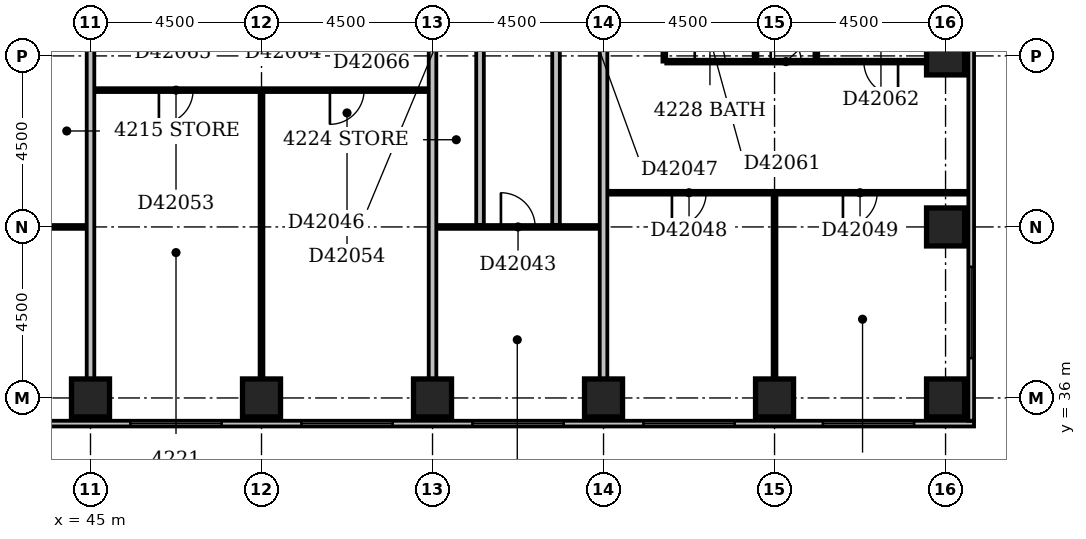
"""IFC4 building model, lengths in metres.
Left out: names, types, materials, properties, quantities, classifications, styles, units other than length and angle.
Written with IfcOpenShell. Run it as: python <this file> out.ifc"""

import sys

from ifc_helpers import new_model, si_unit, direction, frame, frame_2d, origin, origin_2d, place, context, subcontext, project, spatial, rectangle, extrude, element, fill, save


model = new_model("IFC4")
c1 = context("Model", 3, precision=1e-05, world=origin(), true_north=direction((0.0, 1.0)))
c2 = subcontext(c1, "Body", "Model", "MODEL_VIEW")
j1 = project(units=[si_unit("LENGTHUNIT", "METRE"), si_unit("PLANEANGLEUNIT", "RADIAN")], contexts=[c1])
p1 = place(None, origin())
s1 = spatial("IfcSite", under=j1, at=p1, CompositionType="ELEMENT")
p2 = place(p1, origin())
s2 = spatial("IfcBuilding", under=s1, at=p2, CompositionType="ELEMENT")
p3 = place(p2, frame((0.0, 0.0, 166.4)))
s3 = spatial("IfcBuildingStorey", under=s2, at=p3, CompositionType="ELEMENT", Elevation=166.4)
for number, where, z_axis, x_axis in (
    (1, (45.0, 36.0, -0.3), (0.0, 0.0, 1.0), (1.0, 0.0, 0.0)),
    (2, (49.5, 36.0, -0.3), (0.0, 0.0, 1.0), (1.0, 0.0, 0.0)),
    (3, (54.0, 36.0, -0.3), (0.0, 0.0, 1.0), (1.0, 0.0, 0.0)),
    (4, (58.5, 36.0, -0.3), (0.0, 0.0, 1.0), (1.0, 0.0, 0.0)),
    (5, (63.0, 36.0, -0.3), (0.0, 0.0, 1.0), (1.0, 0.0, 0.0)),
    (6, (67.5, 36.0, -0.3), (0.0, 0.0, 1.0), (1.0, 0.0, 0.0)),
    (7, (67.5, 40.5, -0.3), (0.0, 0.0, 1.0), (1.0, 0.0, 0.0)),
    (8, (67.5, 45.0, -0.3), (0.0, 0.0, 1.0), (1.0, 0.0, 0.0)),
):
    element("IfcColumn", number, at=place(p3, frame(where, z_axis=z_axis, x_axis=x_axis)), inside=s3, PredefinedType="COLUMN", context=c2, shape_type="SweptSolid", body=[
        extrude(rectangle(XDim=1.0, YDim=1.0, at=origin_2d()), origin(), (0.0, 0.0, 1.0), 3.6),
    ])
p4 = place(p3, frame((23.1, 35.325, 0.0), z_axis=(0.0, 0.0, 1.0), x_axis=(1.0, 0.0, 0.0)))
e9 = element("IfcWall", 9, at=p4, inside=s3, PredefinedType="STANDARD", context=c2, shape_type="SweptSolid", body=[
    extrude(rectangle(XDim=45.15, YDim=0.15, at=frame_2d((22.575, 0.0))), origin(), (0.0, 0.0, 1.0), 2.7),
])
p5 = place(p4, frame((0.45, 0.0, 0.6)))
e10 = element("IfcOpeningElement", 10, at=p5, cuts=e9, PredefinedType="OPENING", context=c2, shape_type="SweptSolid", body=[
    extrude(rectangle(XDim=2.4, YDim=1.8, at=frame_2d((1.2, 0.9))), frame((0.0, 0.087, 0.0), z_axis=(0.0, -1.0, 0.0), x_axis=(1.0, 0.0, 0.0)), (0.0, 0.0, 1.0), 0.174),
])
p6 = place(p4, frame((4.95, 0.0, 0.6)))
e11 = element("IfcOpeningElement", 11, at=p6, cuts=e9, PredefinedType="OPENING", context=c2, shape_type="SweptSolid", body=[
    extrude(rectangle(XDim=2.4, YDim=1.8, at=frame_2d((1.2, 0.9))), frame((0.0, 0.087, 0.0), z_axis=(0.0, -1.0, 0.0), x_axis=(1.0, 0.0, 0.0)), (0.0, 0.0, 1.0), 0.174),
])
p7 = place(p4, frame((10.665, 0.0, 0.6)))
e12 = element("IfcOpeningElement", 12, at=p7, cuts=e9, PredefinedType="OPENING", context=c2, shape_type="SweptSolid", body=[
    extrude(rectangle(XDim=1.5, YDim=1.8, at=frame_2d((0.75, 0.9))), frame((0.0, 0.087, 0.0), z_axis=(0.0, -1.0, 0.0), x_axis=(1.0, 0.0, 0.0)), (0.0, 0.0, 1.0), 0.174),
])
p8 = place(p4, frame((13.731, 0.0, 0.6)))
e13 = element("IfcOpeningElement", 13, at=p8, cuts=e9, PredefinedType="OPENING", context=c2, shape_type="SweptSolid", body=[
    extrude(rectangle(XDim=1.5, YDim=1.8, at=frame_2d((0.75, 0.9))), frame((0.0, 0.087, 0.0), z_axis=(0.0, -1.0, 0.0), x_axis=(1.0, 0.0, 0.0)), (0.0, 0.0, 1.0), 0.174),
])
p9 = place(p4, frame((18.45, 0.0, 0.6)))
e14 = element("IfcOpeningElement", 14, at=p9, cuts=e9, PredefinedType="OPENING", context=c2, shape_type="SweptSolid", body=[
    extrude(rectangle(XDim=2.4, YDim=1.8, at=frame_2d((1.2, 0.9))), frame((0.0, 0.087, 0.0), z_axis=(0.0, -1.0, 0.0), x_axis=(1.0, 0.0, 0.0)), (0.0, 0.0, 1.0), 0.174),
])
p10 = place(p4, frame((22.95, 0.0, 0.6)))
e15 = element("IfcOpeningElement", 15, at=p10, cuts=e9, PredefinedType="OPENING", context=c2, shape_type="SweptSolid", body=[
    extrude(rectangle(XDim=2.4, YDim=1.8, at=frame_2d((1.2, 0.9))), frame((0.0, 0.087, 0.0), z_axis=(0.0, -1.0, 0.0), x_axis=(1.0, 0.0, 0.0)), (0.0, 0.0, 1.0), 0.174),
])
p11 = place(p4, frame((27.45, 0.0, 0.6)))
e16 = element("IfcOpeningElement", 16, at=p11, cuts=e9, PredefinedType="OPENING", context=c2, shape_type="SweptSolid", body=[
    extrude(rectangle(XDim=2.4, YDim=1.8, at=frame_2d((1.2, 0.9))), frame((0.0, 0.087, 0.0), z_axis=(0.0, -1.0, 0.0), x_axis=(1.0, 0.0, 0.0)), (0.0, 0.0, 1.0), 0.174),
])
p12 = place(p4, frame((31.95, 0.0, 0.6)))
e17 = element("IfcOpeningElement", 17, at=p12, cuts=e9, PredefinedType="OPENING", context=c2, shape_type="SweptSolid", body=[
    extrude(rectangle(XDim=2.4, YDim=1.8, at=frame_2d((1.2, 0.9))), frame((0.0, 0.087, 0.0), z_axis=(0.0, -1.0, 0.0), x_axis=(1.0, 0.0, 0.0)), (0.0, 0.0, 1.0), 0.174),
])
p13 = place(p4, frame((36.45, 0.0, 0.6)))
e18 = element("IfcOpeningElement", 18, at=p13, cuts=e9, PredefinedType="OPENING", context=c2, shape_type="SweptSolid", body=[
    extrude(rectangle(XDim=2.4, YDim=1.8, at=frame_2d((1.2, 0.9))), frame((0.0, 0.087, 0.0), z_axis=(0.0, -1.0, 0.0), x_axis=(1.0, 0.0, 0.0)), (0.0, 0.0, 1.0), 0.174),
])
p14 = place(p4, frame((41.172, 0.0, 0.6)))
e19 = element("IfcOpeningElement", 19, at=p14, cuts=e9, PredefinedType="OPENING", context=c2, shape_type="SweptSolid", body=[
    extrude(rectangle(XDim=2.4, YDim=1.8, at=frame_2d((1.2, 0.9))), frame((0.0, 0.087, 0.0), z_axis=(0.0, -1.0, 0.0), x_axis=(1.0, 0.0, 0.0)), (0.0, 0.0, 1.0), 0.174),
])
p15 = place(p3, frame((68.175, 35.4, 0.0), z_axis=(0.0, 0.0, 1.0), x_axis=(0.0, 1.0, 0.0)))
e20 = element("IfcWall", 20, at=p15, inside=s3, PredefinedType="STANDARD", context=c2, shape_type="SweptSolid", body=[
    extrude(rectangle(XDim=23.85, YDim=0.15, at=frame_2d((11.925, 0.0))), origin(), (0.0, 0.0, 1.0), 2.7),
])
p16 = place(p15, frame((1.65, 0.0, 0.6)))
e21 = element("IfcOpeningElement", 21, at=p16, cuts=e20, PredefinedType="OPENING", context=c2, shape_type="SweptSolid", body=[
    extrude(rectangle(XDim=2.4, YDim=1.8, at=frame_2d((1.2, 0.9))), frame((0.0, 0.087, 0.0), z_axis=(0.0, -1.0, 0.0), x_axis=(1.0, 0.0, 0.0)), (0.0, 0.0, 1.0), 0.174),
])
p17 = place(p15, frame((11.769, 0.0, 0.6)))
e22 = element("IfcOpeningElement", 22, at=p17, cuts=e20, PredefinedType="OPENING", context=c2, shape_type="SweptSolid", body=[
    extrude(rectangle(XDim=1.5, YDim=1.8, at=frame_2d((0.75, 0.9))), frame((0.0, 0.087, 0.0), z_axis=(0.0, -1.0, 0.0), x_axis=(1.0, 0.0, 0.0)), (0.0, 0.0, 1.0), 0.174),
])
p18 = place(p15, frame((19.65, 0.0, 0.6)))
e23 = element("IfcOpeningElement", 23, at=p18, cuts=e20, PredefinedType="OPENING", context=c2, shape_type="SweptSolid", body=[
    extrude(rectangle(XDim=2.4, YDim=1.8, at=frame_2d((1.2, 0.9))), frame((0.0, 0.087, 0.0), z_axis=(0.0, -1.0, 0.0), x_axis=(1.0, 0.0, 0.0)), (0.0, 0.0, 1.0), 0.174),
])
p19 = place(p3, frame((45.0, 36.5, 0.0), z_axis=(0.0, 0.0, 1.0), x_axis=(0.0, 1.0, 0.0)))
e24 = element("IfcWall", 24, at=p19, inside=s3, PredefinedType="PARTITIONING", context=c2, shape_type="SweptSolid", body=[
    extrude(rectangle(XDim=12.9, YDim=0.2, at=frame_2d((6.45, 0.0))), origin(), (0.0, 0.0, 1.0), 2.6),
])
p20 = place(p3, frame((49.5, 36.5, 0.0), z_axis=(0.0, 0.0, 1.0), x_axis=(0.0, 1.0, 0.0)))
e25 = element("IfcWall", 25, at=p20, inside=s3, PredefinedType="PARTITIONING", context=c2, shape_type="SweptSolid", body=[
    extrude(rectangle(XDim=7.55, YDim=0.1, at=frame_2d((3.775, 0.0))), origin(), (0.0, 0.0, 1.0), 3.3),
])
p21 = place(p3, frame((54.0, 36.5, 0.0), z_axis=(0.0, 0.0, 1.0), x_axis=(0.0, 1.0, 0.0)))
e26 = element("IfcWall", 26, at=p21, inside=s3, PredefinedType="PARTITIONING", context=c2, shape_type="SweptSolid", body=[
    extrude(rectangle(XDim=12.9, YDim=0.2, at=frame_2d((6.45, 0.0))), origin(), (0.0, 0.0, 1.0), 2.6),
])
p22 = place(p3, frame((58.5, 36.5, 0.0), z_axis=(0.0, 0.0, 1.0), x_axis=(0.0, 1.0, 0.0)))
e27 = element("IfcWall", 27, at=p22, inside=s3, PredefinedType="PARTITIONING", context=c2, shape_type="SweptSolid", body=[
    extrude(rectangle(XDim=12.9, YDim=0.2, at=frame_2d((6.45, 0.0))), origin(), (0.0, 0.0, 1.0), 3.3),
])
p23 = place(p3, frame((63.0, 36.5, 0.0), z_axis=(0.0, 0.0, 1.0), x_axis=(0.0, 1.0, 0.0)))
e28 = element("IfcWall", 28, at=p23, inside=s3, PredefinedType="PARTITIONING", context=c2, shape_type="SweptSolid", body=[
    extrude(rectangle(XDim=4.85, YDim=0.1, at=frame_2d((2.425, 0.0))), origin(), (0.0, 0.0, 1.0), 2.4),
])
p24 = place(p3, frame((40.6, 40.5, 0.0), z_axis=(0.0, 0.0, 1.0), x_axis=(1.0, 0.0, 0.0)))
e29 = element("IfcWall", 29, at=p24, inside=s3, PredefinedType="PARTITIONING", context=c2, shape_type="SweptSolid", body=[
    extrude(rectangle(XDim=4.3, YDim=0.1, at=frame_2d((2.15, 0.0))), origin(), (0.0, 0.0, 1.0), 3.3),
])
p25 = place(p24, frame((1.7, 0.0, 0.0)))
e30 = element("IfcOpeningElement", 30, at=p25, cuts=e29, PredefinedType="OPENING", context=c2, shape_type="SweptSolid", body=[
    extrude(rectangle(XDim=0.9, YDim=2.1, at=frame_2d((0.45, 1.05))), frame((0.0, 0.062, 0.0), z_axis=(0.0, -1.0, 0.0), x_axis=(1.0, 0.0, 0.0)), (0.0, 0.0, 1.0), 0.124),
])
p26 = place(p3, frame((54.1, 40.5, 0.0), z_axis=(0.0, 0.0, 1.0), x_axis=(1.0, 0.0, 0.0)))
e31 = element("IfcWall", 31, at=p26, inside=s3, PredefinedType="PARTITIONING", context=c2, shape_type="SweptSolid", body=[
    extrude(rectangle(XDim=4.3, YDim=0.1, at=frame_2d((2.15, 0.0))), origin(), (0.0, 0.0, 1.0), 3.3),
])
p27 = place(p26, frame((1.7, 0.0, 0.0)))
e32 = element("IfcOpeningElement", 32, at=p27, cuts=e31, PredefinedType="OPENING", context=c2, shape_type="SweptSolid", body=[
    extrude(rectangle(XDim=0.9, YDim=2.1, at=frame_2d((0.45, 1.05))), frame((0.0, 0.062, 0.0), z_axis=(0.0, -1.0, 0.0), x_axis=(1.0, 0.0, 0.0)), (0.0, 0.0, 1.0), 0.124),
])
p28 = place(p3, frame((55.25, 40.55, 0.0), z_axis=(0.0, 0.0, 1.0), x_axis=(0.0, 1.0, 0.0)))
e33 = element("IfcWall", 33, at=p28, inside=s3, PredefinedType="PARTITIONING", context=c2, shape_type="SweptSolid", body=[
    extrude(rectangle(XDim=8.95, YDim=0.2, at=frame_2d((4.475, 0.0))), origin(), (0.0, 0.0, 1.0), 3.3),
])
p29 = place(p28, frame((5.55, 0.0, 0.0)))
e34 = element("IfcOpeningElement", 34, at=p29, cuts=e33, PredefinedType="OPENING", context=c2, shape_type="SweptSolid", body=[
    extrude(rectangle(XDim=0.8, YDim=2.1, at=frame_2d((0.4, 1.05))), frame((0.0, 0.112, 0.0), z_axis=(0.0, -1.0, 0.0), x_axis=(1.0, 0.0, 0.0)), (0.0, 0.0, 1.0), 0.224),
])
p30 = place(p3, frame((57.25, 40.55, 0.0), z_axis=(0.0, 0.0, 1.0), x_axis=(0.0, 1.0, 0.0)))
e35 = element("IfcWall", 35, at=p30, inside=s3, PredefinedType="PARTITIONING", context=c2, shape_type="SweptSolid", body=[
    extrude(rectangle(XDim=8.95, YDim=0.2, at=frame_2d((4.475, 0.0))), origin(), (0.0, 0.0, 1.0), 3.3),
])
p31 = place(p30, frame((5.55, 0.0, 0.0)))
e36 = element("IfcOpeningElement", 36, at=p31, cuts=e35, PredefinedType="OPENING", context=c2, shape_type="SweptSolid", body=[
    extrude(rectangle(XDim=0.8, YDim=2.1, at=frame_2d((0.4, 1.05))), frame((0.0, 0.112, 0.0), z_axis=(0.0, -1.0, 0.0), x_axis=(1.0, 0.0, 0.0)), (0.0, 0.0, 1.0), 0.224),
])
p32 = place(p3, frame((58.6, 41.4, 0.0), z_axis=(0.0, 0.0, 1.0), x_axis=(1.0, 0.0, 0.0)))
e37 = element("IfcWall", 37, at=p32, inside=s3, PredefinedType="PARTITIONING", context=c2, shape_type="SweptSolid", body=[
    extrude(rectangle(XDim=9.5, YDim=0.1, at=frame_2d((4.75, 0.0))), origin(), (0.0, 0.0, 1.0), 3.3),
])
p33 = place(p32, frame((1.7, 0.0, 0.0)))
e38 = element("IfcOpeningElement", 38, at=p33, cuts=e37, PredefinedType="OPENING", context=c2, shape_type="SweptSolid", body=[
    extrude(rectangle(XDim=0.9, YDim=2.1, at=frame_2d((0.45, 1.05))), frame((0.0, 0.062, 0.0), z_axis=(0.0, -1.0, 0.0), x_axis=(1.0, 0.0, 0.0)), (0.0, 0.0, 1.0), 0.124),
])
p34 = place(p32, frame((6.2, 0.0, 0.0)))
e39 = element("IfcOpeningElement", 39, at=p34, cuts=e37, PredefinedType="OPENING", context=c2, shape_type="SweptSolid", body=[
    extrude(rectangle(XDim=0.9, YDim=2.1, at=frame_2d((0.45, 1.05))), frame((0.0, 0.062, 0.0), z_axis=(0.0, -1.0, 0.0), x_axis=(1.0, 0.0, 0.0)), (0.0, 0.0, 1.0), 0.124),
])
p35 = place(p3, frame((45.1, 44.1, 0.0), z_axis=(0.0, 0.0, 1.0), x_axis=(1.0, 0.0, 0.0)))
e40 = element("IfcWall", 40, at=p35, inside=s3, PredefinedType="PARTITIONING", context=c2, shape_type="SweptSolid", body=[
    extrude(rectangle(XDim=8.8, YDim=0.1, at=frame_2d((4.4, 0.0))), origin(), (0.0, 0.0, 1.0), 3.3),
])
p36 = place(p35, frame((1.7, 0.0, 0.0)))
e41 = element("IfcOpeningElement", 41, at=p36, cuts=e40, PredefinedType="OPENING", context=c2, shape_type="SweptSolid", body=[
    extrude(rectangle(XDim=0.9, YDim=2.1, at=frame_2d((0.45, 1.05))), frame((0.0, 0.062, 0.0), z_axis=(0.0, -1.0, 0.0), x_axis=(1.0, 0.0, 0.0)), (0.0, 0.0, 1.0), 0.124),
])
p37 = place(p35, frame((6.2, 0.0, 0.0)))
e42 = element("IfcOpeningElement", 42, at=p37, cuts=e40, PredefinedType="OPENING", context=c2, shape_type="SweptSolid", body=[
    extrude(rectangle(XDim=0.9, YDim=2.1, at=frame_2d((0.45, 1.05))), frame((0.0, 0.062, 0.0), z_axis=(0.0, -1.0, 0.0), x_axis=(1.0, 0.0, 0.0)), (0.0, 0.0, 1.0), 0.124),
])
p38 = place(p3, frame((60.1, 44.85, 0.0), z_axis=(0.0, 0.0, 1.0), x_axis=(0.0, 1.0, 0.0)))
e43 = element("IfcWall", 43, at=p38, inside=s3, PredefinedType="PLUMBINGWALL", context=c2, shape_type="SweptSolid", body=[
    extrude(rectangle(XDim=4.55, YDim=0.1, at=frame_2d((2.275, 0.0))), origin(), (0.0, 0.0, 1.0), 3.3),
])
p39 = place(p3, frame((60.15, 44.85, 0.0), z_axis=(0.0, 0.0, 1.0), x_axis=(1.0, 0.0, 0.0)))
e44 = element("IfcWall", 44, at=p39, inside=s3, PredefinedType="PARTITIONING", context=c2, shape_type="SweptSolid", body=[
    extrude(rectangle(XDim=6.85, YDim=0.1, at=frame_2d((3.425, 0.0))), origin(), (0.0, 0.0, 1.0), 3.3),
])
p40 = place(p39, frame((0.75, 0.0, 0.0)))
e45 = element("IfcOpeningElement", 45, at=p40, cuts=e44, PredefinedType="OPENING", context=c2, shape_type="SweptSolid", body=[
    extrude(rectangle(XDim=0.8, YDim=2.1, at=frame_2d((0.4, 1.05))), frame((0.0, 0.062, 0.0), z_axis=(0.0, -1.0, 0.0), x_axis=(1.0, 0.0, 0.0)), (0.0, 0.0, 1.0), 0.124),
])
p41 = place(p39, frame((5.2, 0.0, 0.0)))
e46 = element("IfcOpeningElement", 46, at=p41, cuts=e44, PredefinedType="OPENING", context=c2, shape_type="SweptSolid", body=[
    extrude(rectangle(XDim=0.9, YDim=2.1, at=frame_2d((0.45, 1.05))), frame((0.0, 0.062, 0.0), z_axis=(0.0, -1.0, 0.0), x_axis=(1.0, 0.0, 0.0)), (0.0, 0.0, 1.0), 0.124),
])
p42 = place(p39, frame((2.75, 0.0, 0.0)))
e47 = element("IfcOpeningElement", 47, at=p42, cuts=e44, PredefinedType="OPENING", context=c2, shape_type="SweptSolid", body=[
    extrude(rectangle(XDim=0.8, YDim=2.1, at=frame_2d((0.4, 1.05))), frame((0.0, 0.062, 0.0), z_axis=(0.0, -1.0, 0.0), x_axis=(1.0, 0.0, 0.0)), (0.0, 0.0, 1.0), 0.124),
])
p43 = place(p3, frame((62.5, 44.9, 0.0), z_axis=(0.0, 0.0, 1.0), x_axis=(0.0, 1.0, 0.0)))
e48 = element("IfcWall", 48, at=p43, inside=s3, PredefinedType="PLUMBINGWALL", context=c2, shape_type="SweptSolid", body=[
    extrude(rectangle(XDim=4.5, YDim=0.1, at=frame_2d((2.25, 0.0))), origin(), (0.0, 0.0, 1.0), 2.4),
])
p44 = place(p3, frame((64.1, 44.9, 0.0), z_axis=(0.0, 0.0, 1.0), x_axis=(0.0, 1.0, 0.0)))
e49 = element("IfcWall", 49, at=p44, inside=s3, PredefinedType="PARTITIONING", context=c2, shape_type="SweptSolid", body=[
    extrude(rectangle(XDim=4.5, YDim=0.1, at=frame_2d((2.25, 0.0))), origin(), (0.0, 0.0, 1.0), 3.3),
])
p45 = place(p10, origin())
e50 = element("IfcWindow", 50, at=p45, inside=s3, PartitioningType="SINGLE_PANEL", PredefinedType="WINDOW", context=c2, shape_type="SweptSolid", body=[
    extrude(rectangle(XDim=2.4, YDim=1.8, at=frame_2d((1.2, 0.9))), frame((0.0, 0.03, 0.0), z_axis=(0.0, -1.0, 0.0), x_axis=(1.0, 0.0, 0.0)), (0.0, 0.0, 1.0), 0.06),
])
fill(e15, e50)
p46 = place(p11, origin())
e51 = element("IfcWindow", 51, at=p46, inside=s3, PartitioningType="SINGLE_PANEL", PredefinedType="WINDOW", context=c2, shape_type="SweptSolid", body=[
    extrude(rectangle(XDim=2.4, YDim=1.8, at=frame_2d((1.2, 0.9))), frame((0.0, 0.03, 0.0), z_axis=(0.0, -1.0, 0.0), x_axis=(1.0, 0.0, 0.0)), (0.0, 0.0, 1.0), 0.06),
])
fill(e16, e51)
p47 = place(p12, origin())
e52 = element("IfcWindow", 52, at=p47, inside=s3, PartitioningType="SINGLE_PANEL", PredefinedType="WINDOW", context=c2, shape_type="SweptSolid", body=[
    extrude(rectangle(XDim=2.4, YDim=1.8, at=frame_2d((1.2, 0.9))), frame((0.0, 0.03, 0.0), z_axis=(0.0, -1.0, 0.0), x_axis=(1.0, 0.0, 0.0)), (0.0, 0.0, 1.0), 0.06),
])
fill(e17, e52)
p48 = place(p13, origin())
e53 = element("IfcWindow", 53, at=p48, inside=s3, PartitioningType="SINGLE_PANEL", PredefinedType="WINDOW", context=c2, shape_type="SweptSolid", body=[
    extrude(rectangle(XDim=2.4, YDim=1.8, at=frame_2d((1.2, 0.9))), frame((0.0, 0.03, 0.0), z_axis=(0.0, -1.0, 0.0), x_axis=(1.0, 0.0, 0.0)), (0.0, 0.0, 1.0), 0.06),
])
fill(e18, e53)
p49 = place(p14, origin())
e54 = element("IfcWindow", 54, at=p49, inside=s3, PartitioningType="SINGLE_PANEL", PredefinedType="WINDOW", context=c2, shape_type="SweptSolid", body=[
    extrude(rectangle(XDim=2.4, YDim=1.8, at=frame_2d((1.2, 0.9))), frame((0.0, 0.03, 0.0), z_axis=(0.0, -1.0, 0.0), x_axis=(1.0, 0.0, 0.0)), (0.0, 0.0, 1.0), 0.06),
])
fill(e19, e54)
p50 = place(p16, origin())
e55 = element("IfcWindow", 55, at=p50, inside=s3, PartitioningType="SINGLE_PANEL", PredefinedType="WINDOW", context=c2, shape_type="SweptSolid", body=[
    extrude(rectangle(XDim=2.4, YDim=1.8, at=frame_2d((1.2, 0.9))), frame((0.0, 0.03, 0.0), z_axis=(0.0, -1.0, 0.0), x_axis=(1.0, 0.0, 0.0)), (0.0, 0.0, 1.0), 0.06),
])
fill(e21, e55)
p51 = place(p27, origin())
e56 = element("IfcDoor", 56, at=p51, inside=s3, OperationType="SINGLE_SWING_LEFT", PredefinedType="DOOR", context=c2, shape_type="SweptSolid", body=[
    extrude(rectangle(XDim=0.9, YDim=2.1, at=frame_2d((0.45, 1.05))), frame((0.0, 0.025, 0.0), z_axis=(0.0, -1.0, 0.0), x_axis=(1.0, 0.0, 0.0)), (0.0, 0.0, 1.0), 0.05),
])
fill(e32, e56)
p52 = place(p33, frame((0.9, 0.0, 0.0), z_axis=(0.0, 0.0, 1.0), x_axis=(-1.0, 0.0, 0.0)))
e57 = element("IfcDoor", 57, at=p52, inside=s3, OperationType="SINGLE_SWING_RIGHT", PredefinedType="DOOR", context=c2, shape_type="SweptSolid", body=[
    extrude(rectangle(XDim=0.9, YDim=2.1, at=frame_2d((0.45, 1.05))), frame((0.0, 0.025, 0.0), z_axis=(0.0, -1.0, 0.0), x_axis=(1.0, 0.0, 0.0)), (0.0, 0.0, 1.0), 0.05),
])
fill(e38, e57)
p53 = place(p34, frame((0.9, 0.0, 0.0), z_axis=(0.0, 0.0, 1.0), x_axis=(-1.0, 0.0, 0.0)))
e58 = element("IfcDoor", 58, at=p53, inside=s3, OperationType="SINGLE_SWING_RIGHT", PredefinedType="DOOR", context=c2, shape_type="SweptSolid", body=[
    extrude(rectangle(XDim=0.9, YDim=2.1, at=frame_2d((0.45, 1.05))), frame((0.0, 0.025, 0.0), z_axis=(0.0, -1.0, 0.0), x_axis=(1.0, 0.0, 0.0)), (0.0, 0.0, 1.0), 0.05),
])
fill(e39, e58)
p54 = place(p36, frame((0.9, 0.0, 0.0), z_axis=(0.0, 0.0, 1.0), x_axis=(-1.0, 0.0, 0.0)))
e59 = element("IfcDoor", 59, at=p54, inside=s3, OperationType="SINGLE_SWING_RIGHT", PredefinedType="DOOR", context=c2, shape_type="SweptSolid", body=[
    extrude(rectangle(XDim=0.9, YDim=2.1, at=frame_2d((0.45, 1.05))), frame((0.0, 0.025, 0.0), z_axis=(0.0, -1.0, 0.0), x_axis=(1.0, 0.0, 0.0)), (0.0, 0.0, 1.0), 0.05),
])
fill(e41, e59)
p55 = place(p37, frame((0.9, 0.0, 0.0), z_axis=(0.0, 0.0, 1.0), x_axis=(-1.0, 0.0, 0.0)))
e60 = element("IfcDoor", 60, at=p55, inside=s3, OperationType="SINGLE_SWING_RIGHT", PredefinedType="DOOR", context=c2, shape_type="SweptSolid", body=[
    extrude(rectangle(XDim=0.9, YDim=2.1, at=frame_2d((0.45, 1.05))), frame((0.0, 0.025, 0.0), z_axis=(0.0, -1.0, 0.0), x_axis=(1.0, 0.0, 0.0)), (0.0, 0.0, 1.0), 0.05),
])
fill(e42, e60)
p56 = place(p40, origin())
e61 = element("IfcDoor", 61, at=p56, inside=s3, OperationType="SINGLE_SWING_LEFT", PredefinedType="DOOR", context=c2, shape_type="SweptSolid", body=[
    extrude(rectangle(XDim=0.8, YDim=2.1, at=frame_2d((0.4, 1.05))), frame((0.0, 0.025, 0.0), z_axis=(0.0, -1.0, 0.0), x_axis=(1.0, 0.0, 0.0)), (0.0, 0.0, 1.0), 0.05),
])
fill(e45, e61)
p57 = place(p41, origin())
e62 = element("IfcDoor", 62, at=p57, inside=s3, OperationType="SINGLE_SWING_RIGHT", PredefinedType="DOOR", context=c2, shape_type="SweptSolid", body=[
    extrude(rectangle(XDim=0.9, YDim=2.1, at=frame_2d((0.45, 1.05))), frame((0.0, 0.025, 0.0), z_axis=(0.0, -1.0, 0.0), x_axis=(1.0, 0.0, 0.0)), (0.0, 0.0, 1.0), 0.05),
])
fill(e46, e62)
p58 = place(p42, origin())
e63 = element("IfcDoor", 63, at=p58, inside=s3, OperationType="SINGLE_SWING_LEFT", PredefinedType="DOOR", context=c2, shape_type="SweptSolid", body=[
    extrude(rectangle(XDim=0.8, YDim=2.1, at=frame_2d((0.4, 1.05))), frame((0.0, 0.025, 0.0), z_axis=(0.0, -1.0, 0.0), x_axis=(1.0, 0.0, 0.0)), (0.0, 0.0, 1.0), 0.05),
])
fill(e47, e63)
save(model, sys.argv[1])
